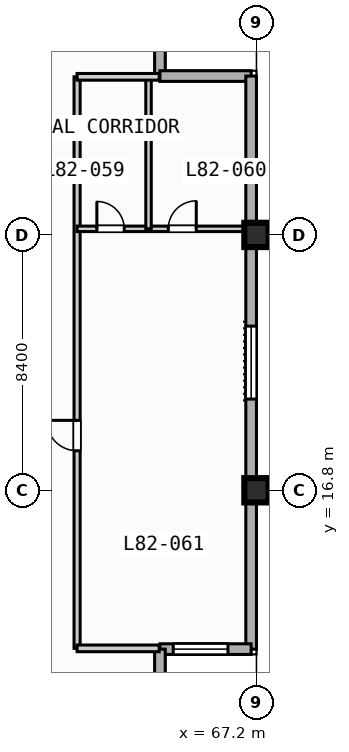
"""IFC4 building model, lengths in metres.
Left out: names, types, materials, properties, quantities, classifications, styles, units other than length and angle.
Written with IfcOpenShell. Run it as: python <this file> out.ifc"""

import sys

from ifc_helpers import new_model, si_unit, direction, frame, frame_2d, origin, origin_2d, place, context, subcontext, project, spatial, rectangle, extrude, element, fill, save


model = new_model("IFC4")
c1 = context("Model", 3, precision=1e-05, world=origin(), true_north=direction((0.0, 1.0)))
c2 = subcontext(c1, "Body", "Model", "MODEL_VIEW")
j1 = project(units=[si_unit("LENGTHUNIT", "METRE"), si_unit("PLANEANGLEUNIT", "RADIAN")], contexts=[c1])
p1 = place(None, origin())
s1 = spatial("IfcSite", under=j1, at=p1, CompositionType="ELEMENT")
p2 = place(p1, origin())
s2 = spatial("IfcBuilding", under=s1, at=p2, CompositionType="ELEMENT")
p3 = place(p2, frame((0.0, 0.0, 332.0)))
s3 = spatial("IfcBuildingStorey", under=s2, at=p3, CompositionType="ELEMENT", Elevation=332.0)
for number, where, z_axis, x_axis in (
    (1, (67.2, 16.8, 0.0), (0.0, 0.0, 1.0), (1.0, 0.0, 0.0)),
    (2, (67.2, 25.2, 0.0), (0.0, 0.0, 1.0), (1.0, 0.0, 0.0)),
):
    element("IfcColumn", number, at=place(p3, frame(where, z_axis=z_axis, x_axis=x_axis)), inside=s3, PredefinedType="COLUMN", context=c2, shape_type="SweptSolid", body=[
        extrude(rectangle(XDim=0.8, YDim=0.8, at=origin_2d()), origin(), (0.0, 0.0, 1.0), 3.9),
    ])
for number, where, z_axis, x_axis in (
    (3, (64.025, 33.425, 0.0), (0.0, 0.0, 1.0), (0.0, -1.0, 0.0)),
    (4, (64.025, 30.425, 0.0), (0.0, 0.0, 1.0), (1.0, 0.0, 0.0)),
):
    element("IfcWall", number, at=place(p3, frame(where, z_axis=z_axis, x_axis=x_axis)), inside=s3, PredefinedType="STANDARD", context=c2, shape_type="SweptSolid", body=[
        extrude(rectangle(XDim=3.0, YDim=0.35, at=frame_2d((1.5, 0.0))), origin(), (0.0, 0.0, 1.0), 3.67),
    ])
p4 = place(p3, frame((67.025, 30.425, 0.0), z_axis=(0.0, 0.0, 1.0), x_axis=(0.0, -1.0, 0.0)))
e5 = element("IfcWall", 5, at=p4, inside=s3, PredefinedType="STANDARD", context=c2, shape_type="SweptSolid", body=[
    extrude(rectangle(XDim=18.85, YDim=0.35, at=frame_2d((9.425, 0.0))), origin(), (0.0, 0.0, 1.0), 3.67),
])
p5 = place(p4, frame((8.225, 0.0, 0.85)))
e6 = element("IfcOpeningElement", 6, at=p5, cuts=e5, PredefinedType="OPENING", context=c2, shape_type="SweptSolid", body=[
    extrude(rectangle(XDim=2.4, YDim=1.95, at=frame_2d((1.2, 0.975))), frame((0.0, 0.185, 0.0), z_axis=(0.0, -1.0, 0.0), x_axis=(1.0, 0.0, 0.0)), (0.0, 0.0, 1.0), 0.37),
])
p6 = place(p3, frame((67.025, 11.575, 0.0), z_axis=(0.0, 0.0, 1.0), x_axis=(-1.0, 0.0, 0.0)))
e7 = element("IfcWall", 7, at=p6, inside=s3, PredefinedType="STANDARD", context=c2, shape_type="SweptSolid", body=[
    extrude(rectangle(XDim=3.0, YDim=0.35, at=frame_2d((1.5, 0.0))), origin(), (0.0, 0.0, 1.0), 3.67),
])
p7 = place(p6, frame((0.762, 0.0, 0.85)))
e8 = element("IfcOpeningElement", 8, at=p7, cuts=e7, PredefinedType="OPENING", context=c2, shape_type="SweptSolid", body=[
    extrude(rectangle(XDim=1.8, YDim=1.8, at=frame_2d((0.9, 0.9))), frame((0.0, 0.185, 0.0), z_axis=(0.0, -1.0, 0.0), x_axis=(1.0, 0.0, 0.0)), (0.0, 0.0, 1.0), 0.37),
])
p8 = place(p3, frame((64.025, 11.575, 0.0), z_axis=(0.0, 0.0, 1.0), x_axis=(0.0, -1.0, 0.0)))
e9 = element("IfcWall", 9, at=p8, inside=s3, PredefinedType="STANDARD", context=c2, shape_type="SweptSolid", body=[
    extrude(rectangle(XDim=3.0, YDim=0.35, at=frame_2d((1.5, 0.0))), origin(), (0.0, 0.0, 1.0), 3.67),
])
p9 = place(p3, frame((61.3, 11.6, 0.0), z_axis=(0.0, 0.0, 1.0), x_axis=(0.0, 1.0, 0.0)))
e10 = element("IfcWall", 10, at=p9, inside=s3, PredefinedType="PARTITIONING", context=c2, shape_type="SweptSolid", body=[
    extrude(rectangle(XDim=18.8, YDim=0.2, at=frame_2d((9.4, 0.0))), origin(), (0.0, 0.0, 1.0), 3.67),
])
p10 = place(p9, frame((6.5, 0.0, 0.0)))
e11 = element("IfcOpeningElement", 11, at=p10, cuts=e10, PredefinedType="OPENING", context=c2, shape_type="SweptSolid", body=[
    extrude(rectangle(XDim=1.0, YDim=2.15, at=frame_2d((0.5, 1.075))), frame((0.0, 0.11, 0.0), z_axis=(0.0, -1.0, 0.0), x_axis=(1.0, 0.0, 0.0)), (0.0, 0.0, 1.0), 0.22),
])
p11 = place(p3, frame((61.3, 25.4, 0.0), z_axis=(0.0, 0.0, 1.0), x_axis=(1.0, 0.0, 0.0)))
e12 = element("IfcWall", 12, at=p11, inside=s3, PredefinedType="PLUMBINGWALL", context=c2, shape_type="SweptSolid", body=[
    extrude(rectangle(XDim=5.5, YDim=0.18, at=frame_2d((2.75, 0.0))), origin(), (0.0, 0.0, 1.0), 3.07),
])
p12 = place(p11, frame((0.65, 0.0, 0.0)))
e13 = element("IfcOpeningElement", 13, at=p12, cuts=e12, PredefinedType="OPENING", context=c2, shape_type="SweptSolid", body=[
    extrude(rectangle(XDim=0.9, YDim=2.1, at=frame_2d((0.45, 1.05))), frame((0.0, 0.1, 0.0), z_axis=(0.0, -1.0, 0.0), x_axis=(1.0, 0.0, 0.0)), (0.0, 0.0, 1.0), 0.2),
])
p13 = place(p11, frame((3.0, 0.0, 0.0)))
e14 = element("IfcOpeningElement", 14, at=p13, cuts=e12, PredefinedType="OPENING", context=c2, shape_type="SweptSolid", body=[
    extrude(rectangle(XDim=0.92, YDim=2.1, at=frame_2d((0.46, 1.05))), frame((0.0, 0.1, 0.0), z_axis=(0.0, -1.0, 0.0), x_axis=(1.0, 0.0, 0.0)), (0.0, 0.0, 1.0), 0.2),
])
p14 = place(p3, frame((63.65, 25.4, 0.0), z_axis=(0.0, 0.0, 1.0), x_axis=(0.0, 1.0, 0.0)))
e15 = element("IfcWall", 15, at=p14, inside=s3, PredefinedType="PLUMBINGWALL", context=c2, shape_type="SweptSolid", body=[
    extrude(rectangle(XDim=5.0, YDim=0.18, at=frame_2d((2.5, 0.0))), origin(), (0.0, 0.0, 1.0), 3.67),
])
for number, where, z_axis, x_axis in (
    (16, (61.3, 11.6, 0.0), (0.0, 0.0, 1.0), (1.0, 0.0, 0.0)),
    (17, (61.3, 30.4, 0.0), (0.0, 0.0, 1.0), (1.0, 0.0, 0.0)),
):
    element("IfcWall", number, at=place(p3, frame(where, z_axis=z_axis, x_axis=x_axis)), inside=s3, PredefinedType="PARTITIONING", context=c2, shape_type="SweptSolid", body=[
        extrude(rectangle(XDim=2.7, YDim=0.22, at=frame_2d((1.35, 0.0))), origin(), (0.0, 0.0, 1.0), 3.67),
    ])
p15 = place(p5, origin())
e18 = element("IfcWindow", 18, at=p15, inside=s3, PartitioningType="SINGLE_PANEL", PredefinedType="WINDOW", context=c2, shape_type="SweptSolid", body=[
    extrude(rectangle(XDim=2.4, YDim=1.95, at=frame_2d((1.2, 0.975))), frame((0.0, 0.03, 0.0), z_axis=(0.0, -1.0, 0.0), x_axis=(1.0, 0.0, 0.0)), (0.0, 0.0, 1.0), 0.06),
])
fill(e6, e18)
p16 = place(p7, origin())
e19 = element("IfcWindow", 19, at=p16, inside=s3, PartitioningType="SINGLE_PANEL", PredefinedType="WINDOW", context=c2, shape_type="SweptSolid", body=[
    extrude(rectangle(XDim=1.8, YDim=1.8, at=frame_2d((0.9, 0.9))), frame((0.0, 0.03, 0.0), z_axis=(0.0, -1.0, 0.0), x_axis=(1.0, 0.0, 0.0)), (0.0, 0.0, 1.0), 0.06),
])
fill(e8, e19)
p17 = place(p10, origin())
e20 = element("IfcDoor", 20, at=p17, inside=s3, OperationType="SINGLE_SWING_RIGHT", PredefinedType="DOOR", context=c2, shape_type="SweptSolid", body=[
    extrude(rectangle(XDim=1.0, YDim=2.15, at=frame_2d((0.5, 1.075))), frame((0.0, 0.025, 0.0), z_axis=(0.0, -1.0, 0.0), x_axis=(1.0, 0.0, 0.0)), (0.0, 0.0, 1.0), 0.05),
])
fill(e11, e20)
p18 = place(p12, origin())
e21 = element("IfcDoor", 21, at=p18, inside=s3, OperationType="SINGLE_SWING_LEFT", PredefinedType="DOOR", context=c2, shape_type="SweptSolid", body=[
    extrude(rectangle(XDim=0.9, YDim=2.1, at=frame_2d((0.45, 1.05))), frame((0.0, 0.025, 0.0), z_axis=(0.0, -1.0, 0.0), x_axis=(1.0, 0.0, 0.0)), (0.0, 0.0, 1.0), 0.05),
])
fill(e13, e21)
p19 = place(p13, origin())
e22 = element("IfcDoor", 22, at=p19, inside=s3, OperationType="SINGLE_SWING_RIGHT", PredefinedType="DOOR", context=c2, shape_type="SweptSolid", body=[
    extrude(rectangle(XDim=0.92, YDim=2.1, at=frame_2d((0.46, 1.05))), frame((0.0, 0.025, 0.0), z_axis=(0.0, -1.0, 0.0), x_axis=(1.0, 0.0, 0.0)), (0.0, 0.0, 1.0), 0.05),
])
fill(e14, e22)
save(model, sys.argv[1])
